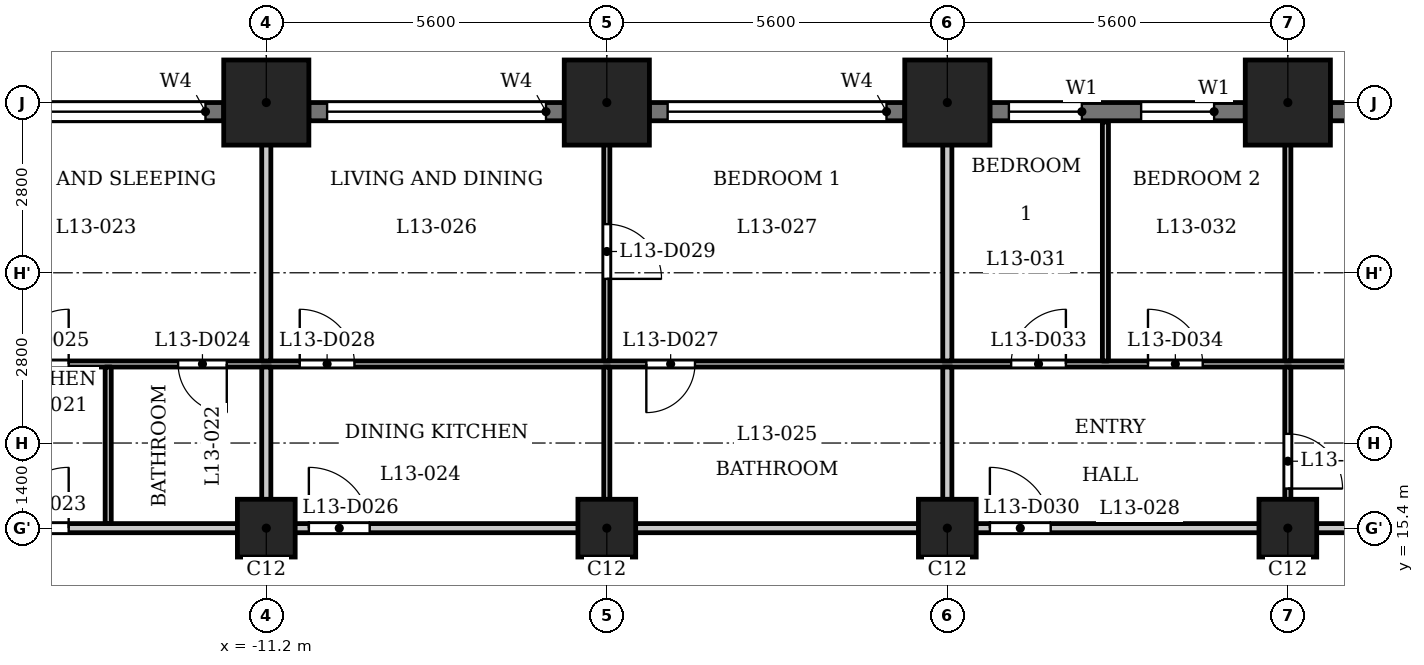
"""IFC4 building model, lengths in metres.
Left out: names, types, materials, properties, quantities, classifications, styles, units other than length and angle.
Written with IfcOpenShell. Run it as: python <this file> out.ifc"""

import sys

from ifc_helpers import new_model, si_unit, direction, frame, frame_2d, origin, origin_2d, place, context, subcontext, project, spatial, rectangle, extrude, element, fill, save


model = new_model("IFC4")
c1 = context("Model", 3, precision=1e-05, world=origin(), true_north=direction((0.0, 1.0)))
c2 = subcontext(c1, "Body", "Model", "MODEL_VIEW")
j1 = project(units=[si_unit("LENGTHUNIT", "METRE"), si_unit("PLANEANGLEUNIT", "RADIAN")], contexts=[c1])
p1 = place(None, origin())
s1 = spatial("IfcSite", under=j1, at=p1, CompositionType="ELEMENT")
p2 = place(p1, origin())
s2 = spatial("IfcBuilding", under=s1, at=p2, CompositionType="ELEMENT")
p3 = place(p2, frame((0.0, 0.0, 55.0)))
s3 = spatial("IfcBuildingStorey", under=s2, at=p3, CompositionType="ELEMENT", Elevation=55.0)
for number, where, z_axis, x_axis in (
    (1, (5.6, 22.4, 0.0), (0.0, 0.0, 1.0), (1.0, 0.0, 0.0)),
    (2, (0.0, 22.4, 0.0), (0.0, 0.0, 1.0), (1.0, 0.0, 0.0)),
    (3, (-5.6, 22.4, 0.0), (0.0, 0.0, 1.0), (1.0, 0.0, 0.0)),
    (4, (-11.2, 22.4, 0.0), (0.0, 0.0, 1.0), (1.0, 0.0, 0.0)),
):
    element("IfcColumn", number, at=place(p3, frame(where, z_axis=z_axis, x_axis=x_axis)), inside=s3, PredefinedType="COLUMN", context=c2, shape_type="SweptSolid", body=[
        extrude(rectangle(XDim=1.4, YDim=1.4, at=origin_2d()), origin(), (0.0, 0.0, 1.0), 3.5),
    ])
for number, where, z_axis, x_axis in (
    (5, (-11.2, 15.4, 0.0), (0.0, 0.0, 1.0), (1.0, 0.0, 0.0)),
    (6, (-5.6, 15.4, 0.0), (0.0, 0.0, 1.0), (1.0, 0.0, 0.0)),
    (7, (0.0, 15.4, 0.0), (0.0, 0.0, 1.0), (1.0, 0.0, 0.0)),
    (8, (5.6, 15.4, 0.0), (0.0, 0.0, 1.0), (1.0, 0.0, 0.0)),
):
    element("IfcColumn", number, at=place(p3, frame(where, z_axis=z_axis, x_axis=x_axis)), inside=s3, PredefinedType="COLUMN", context=c2, shape_type="SweptSolid", body=[
        extrude(rectangle(XDim=0.95, YDim=0.95, at=origin_2d()), origin(), (0.0, 0.0, 1.0), 3.5),
    ])
p4 = place(p3, frame((10.5, 22.25, 0.0), z_axis=(0.0, 0.0, 1.0), x_axis=(-1.0, 0.0, 0.0)))
e9 = element("IfcWall", 9, at=p4, inside=s3, PredefinedType="SOLIDWALL", context=c2, shape_type="SweptSolid", body=[
    extrude(rectangle(XDim=4.2, YDim=0.3, at=frame_2d((2.1, 0.0))), origin(), (0.0, 0.0, 1.0), 2.35),
])
p5 = place(p4, frame((0.3, 0.0, 1.2)))
e10 = element("IfcOpeningElement", 10, at=p5, cuts=e9, PredefinedType="OPENING", context=c2, shape_type="SweptSolid", body=[
    extrude(rectangle(XDim=3.6, YDim=0.95, at=frame_2d((1.8, 0.475))), frame((0.0, 0.16, 0.0), z_axis=(0.0, -1.0, 0.0), x_axis=(1.0, 0.0, 0.0)), (0.0, 0.0, 1.0), 0.32),
])
p6 = place(p3, frame((4.9, 22.25, 0.0), z_axis=(0.0, 0.0, 1.0), x_axis=(-1.0, 0.0, 0.0)))
e11 = element("IfcWall", 11, at=p6, inside=s3, PredefinedType="SOLIDWALL", context=c2, shape_type="SweptSolid", body=[
    extrude(rectangle(XDim=4.2, YDim=0.3, at=frame_2d((2.1, 0.0))), origin(), (0.0, 0.0, 1.0), 2.35),
])
p7 = place(p6, frame((0.512, 0.0, 0.6)))
e12 = element("IfcOpeningElement", 12, at=p7, cuts=e11, PredefinedType="OPENING", context=c2, shape_type="SweptSolid", body=[
    extrude(rectangle(XDim=1.2, YDim=1.55, at=frame_2d((0.6, 0.775))), frame((0.0, 0.16, 0.0), z_axis=(0.0, -1.0, 0.0), x_axis=(1.0, 0.0, 0.0)), (0.0, 0.0, 1.0), 0.32),
])
p8 = place(p6, frame((2.688, 0.0, 0.6)))
e13 = element("IfcOpeningElement", 13, at=p8, cuts=e11, PredefinedType="OPENING", context=c2, shape_type="SweptSolid", body=[
    extrude(rectangle(XDim=1.2, YDim=1.55, at=frame_2d((0.6, 0.775))), frame((0.0, 0.16, 0.0), z_axis=(0.0, -1.0, 0.0), x_axis=(1.0, 0.0, 0.0)), (0.0, 0.0, 1.0), 0.32),
])
p9 = place(p3, frame((-0.7, 22.25, 0.0), z_axis=(0.0, 0.0, 1.0), x_axis=(-1.0, 0.0, 0.0)))
e14 = element("IfcWall", 14, at=p9, inside=s3, PredefinedType="SOLIDWALL", context=c2, shape_type="SweptSolid", body=[
    extrude(rectangle(XDim=4.2, YDim=0.3, at=frame_2d((2.1, 0.0))), origin(), (0.0, 0.0, 1.0), 2.35),
])
p10 = place(p9, frame((0.3, 0.0, 1.2)))
e15 = element("IfcOpeningElement", 15, at=p10, cuts=e14, PredefinedType="OPENING", context=c2, shape_type="SweptSolid", body=[
    extrude(rectangle(XDim=3.6, YDim=0.95, at=frame_2d((1.8, 0.475))), frame((0.0, 0.16, 0.0), z_axis=(0.0, -1.0, 0.0), x_axis=(1.0, 0.0, 0.0)), (0.0, 0.0, 1.0), 0.32),
])
p11 = place(p3, frame((-6.3, 22.25, 0.0), z_axis=(0.0, 0.0, 1.0), x_axis=(-1.0, 0.0, 0.0)))
e16 = element("IfcWall", 16, at=p11, inside=s3, PredefinedType="SOLIDWALL", context=c2, shape_type="SweptSolid", body=[
    extrude(rectangle(XDim=4.2, YDim=0.3, at=frame_2d((2.1, 0.0))), origin(), (0.0, 0.0, 1.0), 2.35),
])
p12 = place(p11, frame((0.3, 0.0, 1.2)))
e17 = element("IfcOpeningElement", 17, at=p12, cuts=e16, PredefinedType="OPENING", context=c2, shape_type="SweptSolid", body=[
    extrude(rectangle(XDim=3.6, YDim=0.95, at=frame_2d((1.8, 0.475))), frame((0.0, 0.16, 0.0), z_axis=(0.0, -1.0, 0.0), x_axis=(1.0, 0.0, 0.0)), (0.0, 0.0, 1.0), 0.32),
])
p13 = place(p3, frame((-11.9, 22.25, 0.0), z_axis=(0.0, 0.0, 1.0), x_axis=(-1.0, 0.0, 0.0)))
e18 = element("IfcWall", 18, at=p13, inside=s3, PredefinedType="SOLIDWALL", context=c2, shape_type="SweptSolid", body=[
    extrude(rectangle(XDim=4.2, YDim=0.3, at=frame_2d((2.1, 0.0))), origin(), (0.0, 0.0, 1.0), 2.35),
])
p14 = place(p13, frame((0.3, 0.0, 1.2)))
e19 = element("IfcOpeningElement", 19, at=p14, cuts=e18, PredefinedType="OPENING", context=c2, shape_type="SweptSolid", body=[
    extrude(rectangle(XDim=3.6, YDim=0.95, at=frame_2d((1.8, 0.475))), frame((0.0, 0.16, 0.0), z_axis=(0.0, -1.0, 0.0), x_axis=(1.0, 0.0, 0.0)), (0.0, 0.0, 1.0), 0.32),
])
p15 = place(p3, frame((-27.484, 15.4, 0.0), z_axis=(0.0, 0.0, 1.0), x_axis=(1.0, 0.0, 0.0)))
e20 = element("IfcWall", 20, at=p15, inside=s3, PredefinedType="PARTITIONING", context=c2, shape_type="SweptSolid", body=[
    extrude(rectangle(XDim=54.968, YDim=0.15, at=frame_2d((27.484, 0.0))), origin(), (0.0, 0.0, 1.0), 3.2),
])
p16 = place(p15, frame((8.784, 0.0, 0.0)))
e21 = element("IfcOpeningElement", 21, at=p16, cuts=e20, PredefinedType="OPENING", context=c2, shape_type="SweptSolid", body=[
    extrude(rectangle(XDim=1.0, YDim=2.1, at=frame_2d((0.5, 1.05))), frame((0.0, 0.085, 0.0), z_axis=(0.0, -1.0, 0.0), x_axis=(1.0, 0.0, 0.0)), (0.0, 0.0, 1.0), 0.17),
])
p17 = place(p15, frame((12.034, 0.0, 0.0)))
e22 = element("IfcOpeningElement", 22, at=p17, cuts=e20, PredefinedType="OPENING", context=c2, shape_type="SweptSolid", body=[
    extrude(rectangle(XDim=1.0, YDim=2.1, at=frame_2d((0.5, 1.05))), frame((0.0, 0.085, 0.0), z_axis=(0.0, -1.0, 0.0), x_axis=(1.0, 0.0, 0.0)), (0.0, 0.0, 1.0), 0.17),
])
p18 = place(p15, frame((16.984, 0.0, 0.0)))
e23 = element("IfcOpeningElement", 23, at=p18, cuts=e20, PredefinedType="OPENING", context=c2, shape_type="SweptSolid", body=[
    extrude(rectangle(XDim=1.0, YDim=2.1, at=frame_2d((0.5, 1.05))), frame((0.0, 0.085, 0.0), z_axis=(0.0, -1.0, 0.0), x_axis=(1.0, 0.0, 0.0)), (0.0, 0.0, 1.0), 0.17),
])
p19 = place(p15, frame((28.184, 0.0, 0.0)))
e24 = element("IfcOpeningElement", 24, at=p19, cuts=e20, PredefinedType="OPENING", context=c2, shape_type="SweptSolid", body=[
    extrude(rectangle(XDim=1.0, YDim=2.1, at=frame_2d((0.5, 1.05))), frame((0.0, 0.085, 0.0), z_axis=(0.0, -1.0, 0.0), x_axis=(1.0, 0.0, 0.0)), (0.0, 0.0, 1.0), 0.17),
])
p20 = place(p15, frame((48.234, 0.0, 0.0)))
e25 = element("IfcOpeningElement", 25, at=p20, cuts=e20, PredefinedType="OPENING", context=c2, shape_type="SweptSolid", body=[
    extrude(rectangle(XDim=1.0, YDim=2.1, at=frame_2d((0.5, 1.05))), frame((0.0, 0.085, 0.0), z_axis=(0.0, -1.0, 0.0), x_axis=(1.0, 0.0, 0.0)), (0.0, 0.0, 1.0), 0.17),
])
p21 = place(p3, frame((-26.44, 18.1, 0.0), z_axis=(0.0, 0.0, 1.0), x_axis=(1.0, 0.0, 0.0)))
e26 = element("IfcWall", 26, at=p21, inside=s3, PredefinedType="PARTITIONING", context=c2, shape_type="SweptSolid", body=[
    extrude(rectangle(XDim=52.63, YDim=0.1, at=frame_2d((26.315, 0.0))), origin(), (0.0, 0.0, 1.0), 3.2),
])
p22 = place(p21, frame((2.626, 0.0, 0.0)))
e27 = element("IfcOpeningElement", 27, at=p22, cuts=e26, PredefinedType="OPENING", context=c2, shape_type="SweptSolid", body=[
    extrude(rectangle(XDim=0.8, YDim=2.1, at=frame_2d((0.4, 1.05))), frame((0.0, 0.06, 0.0), z_axis=(0.0, -1.0, 0.0), x_axis=(1.0, 0.0, 0.0)), (0.0, 0.0, 1.0), 0.12),
])
p23 = place(p21, frame((7.84, 0.0, 0.0)))
e28 = element("IfcOpeningElement", 28, at=p23, cuts=e26, PredefinedType="OPENING", context=c2, shape_type="SweptSolid", body=[
    extrude(rectangle(XDim=0.9, YDim=2.1, at=frame_2d((0.45, 1.05))), frame((0.0, 0.06, 0.0), z_axis=(0.0, -1.0, 0.0), x_axis=(1.0, 0.0, 0.0)), (0.0, 0.0, 1.0), 0.12),
])
p24 = place(p21, frame((13.79, 0.0, 0.0)))
e29 = element("IfcOpeningElement", 29, at=p24, cuts=e26, PredefinedType="OPENING", context=c2, shape_type="SweptSolid", body=[
    extrude(rectangle(XDim=0.8, YDim=2.1, at=frame_2d((0.4, 1.05))), frame((0.0, 0.06, 0.0), z_axis=(0.0, -1.0, 0.0), x_axis=(1.0, 0.0, 0.0)), (0.0, 0.0, 1.0), 0.12),
])
p25 = place(p21, frame((11.09, 0.0, 0.0)))
e30 = element("IfcOpeningElement", 30, at=p25, cuts=e26, PredefinedType="OPENING", context=c2, shape_type="SweptSolid", body=[
    extrude(rectangle(XDim=0.9, YDim=2.1, at=frame_2d((0.45, 1.05))), frame((0.0, 0.06, 0.0), z_axis=(0.0, -1.0, 0.0), x_axis=(1.0, 0.0, 0.0)), (0.0, 0.0, 1.0), 0.12),
])
p26 = place(p21, frame((21.49, 0.0, 0.0)))
e31 = element("IfcOpeningElement", 31, at=p26, cuts=e26, PredefinedType="OPENING", context=c2, shape_type="SweptSolid", body=[
    extrude(rectangle(XDim=0.8, YDim=2.1, at=frame_2d((0.4, 1.05))), frame((0.0, 0.06, 0.0), z_axis=(0.0, -1.0, 0.0), x_axis=(1.0, 0.0, 0.0)), (0.0, 0.0, 1.0), 0.12),
])
p27 = place(p21, frame((15.79, 0.0, 0.0)))
e32 = element("IfcOpeningElement", 32, at=p27, cuts=e26, PredefinedType="OPENING", context=c2, shape_type="SweptSolid", body=[
    extrude(rectangle(XDim=0.9, YDim=2.1, at=frame_2d((0.45, 1.05))), frame((0.0, 0.06, 0.0), z_axis=(0.0, -1.0, 0.0), x_axis=(1.0, 0.0, 0.0)), (0.0, 0.0, 1.0), 0.12),
])
p28 = place(p21, frame((27.49, 0.0, 0.0)))
e33 = element("IfcOpeningElement", 33, at=p28, cuts=e26, PredefinedType="OPENING", context=c2, shape_type="SweptSolid", body=[
    extrude(rectangle(XDim=0.9, YDim=2.1, at=frame_2d((0.45, 1.05))), frame((0.0, 0.06, 0.0), z_axis=(0.0, -1.0, 0.0), x_axis=(1.0, 0.0, 0.0)), (0.0, 0.0, 1.0), 0.12),
])
p29 = place(p21, frame((29.74, 0.0, 0.0)))
e34 = element("IfcOpeningElement", 34, at=p29, cuts=e26, PredefinedType="OPENING", context=c2, shape_type="SweptSolid", body=[
    extrude(rectangle(XDim=0.9, YDim=2.1, at=frame_2d((0.45, 1.05))), frame((0.0, 0.06, 0.0), z_axis=(0.0, -1.0, 0.0), x_axis=(1.0, 0.0, 0.0)), (0.0, 0.0, 1.0), 0.12),
])
p30 = place(p21, frame((35.84, 0.0, 0.0)))
e35 = element("IfcOpeningElement", 35, at=p30, cuts=e26, PredefinedType="OPENING", context=c2, shape_type="SweptSolid", body=[
    extrude(rectangle(XDim=0.9, YDim=2.1, at=frame_2d((0.45, 1.05))), frame((0.0, 0.06, 0.0), z_axis=(0.0, -1.0, 0.0), x_axis=(1.0, 0.0, 0.0)), (0.0, 0.0, 1.0), 0.12),
])
p31 = place(p21, frame((50.74, 0.0, 0.0)))
e36 = element("IfcOpeningElement", 36, at=p31, cuts=e26, PredefinedType="OPENING", context=c2, shape_type="SweptSolid", body=[
    extrude(rectangle(XDim=0.8, YDim=2.1, at=frame_2d((0.4, 1.05))), frame((0.0, 0.06, 0.0), z_axis=(0.0, -1.0, 0.0), x_axis=(1.0, 0.0, 0.0)), (0.0, 0.0, 1.0), 0.12),
])
p32 = place(p21, frame((47.29, 0.0, 0.0)))
e37 = element("IfcOpeningElement", 37, at=p32, cuts=e26, PredefinedType="OPENING", context=c2, shape_type="SweptSolid", body=[
    extrude(rectangle(XDim=0.9, YDim=2.1, at=frame_2d((0.45, 1.05))), frame((0.0, 0.06, 0.0), z_axis=(0.0, -1.0, 0.0), x_axis=(1.0, 0.0, 0.0)), (0.0, 0.0, 1.0), 0.12),
])
p33 = place(p3, frame((-13.8, 15.475, 0.0), z_axis=(0.0, 0.0, 1.0), x_axis=(0.0, 1.0, 0.0)))
e38 = element("IfcWall", 38, at=p33, inside=s3, PredefinedType="PARTITIONING", context=c2, shape_type="SweptSolid", body=[
    extrude(rectangle(XDim=2.575, YDim=0.1, at=frame_2d((1.288, 0.0))), origin(), (0.0, 0.0, 1.0), 3.2),
])
p34 = place(p3, frame((-11.2, 15.475, 0.0), z_axis=(0.0, 0.0, 1.0), x_axis=(0.0, 1.0, 0.0)))
e39 = element("IfcWall", 39, at=p34, inside=s3, PredefinedType="PARTITIONING", context=c2, shape_type="SweptSolid", body=[
    extrude(rectangle(XDim=2.575, YDim=0.15, at=frame_2d((1.288, 0.0))), origin(), (0.0, 0.0, 1.0), 3.2),
])
p35 = place(p3, frame((-11.2, 18.15, 0.0), z_axis=(0.0, 0.0, 1.0), x_axis=(0.0, 1.0, 0.0)))
e40 = element("IfcWall", 40, at=p35, inside=s3, PredefinedType="PARTITIONING", context=c2, shape_type="SweptSolid", body=[
    extrude(rectangle(XDim=4.93, YDim=0.15, at=frame_2d((2.465, 0.0))), origin(), (0.0, 0.0, 1.0), 3.2),
])
p36 = place(p3, frame((-5.6, 15.475, 0.0), z_axis=(0.0, 0.0, 1.0), x_axis=(0.0, 1.0, 0.0)))
e41 = element("IfcWall", 41, at=p36, inside=s3, PredefinedType="PARTITIONING", context=c2, shape_type="SweptSolid", body=[
    extrude(rectangle(XDim=2.575, YDim=0.1, at=frame_2d((1.288, 0.0))), origin(), (0.0, 0.0, 1.0), 3.2),
])
p37 = place(p3, frame((-5.6, 18.15, 0.0), z_axis=(0.0, 0.0, 1.0), x_axis=(0.0, 1.0, 0.0)))
e42 = element("IfcWall", 42, at=p37, inside=s3, PredefinedType="PARTITIONING", context=c2, shape_type="SweptSolid", body=[
    extrude(rectangle(XDim=4.93, YDim=0.1, at=frame_2d((2.465, 0.0))), origin(), (0.0, 0.0, 1.0), 3.2),
])
p38 = place(p37, frame((1.35, 0.0, 0.0)))
e43 = element("IfcOpeningElement", 43, at=p38, cuts=e42, PredefinedType="OPENING", context=c2, shape_type="SweptSolid", body=[
    extrude(rectangle(XDim=0.9, YDim=2.1, at=frame_2d((0.45, 1.05))), frame((0.0, 0.06, 0.0), z_axis=(0.0, -1.0, 0.0), x_axis=(1.0, 0.0, 0.0)), (0.0, 0.0, 1.0), 0.12),
])
p39 = place(p3, frame((0.0, 15.475, 0.0), z_axis=(0.0, 0.0, 1.0), x_axis=(0.0, 1.0, 0.0)))
e44 = element("IfcWall", 44, at=p39, inside=s3, PredefinedType="PARTITIONING", context=c2, shape_type="SweptSolid", body=[
    extrude(rectangle(XDim=2.575, YDim=0.15, at=frame_2d((1.288, 0.0))), origin(), (0.0, 0.0, 1.0), 3.2),
])
p40 = place(p3, frame((0.0, 18.15, 0.0), z_axis=(0.0, 0.0, 1.0), x_axis=(0.0, 1.0, 0.0)))
e45 = element("IfcWall", 45, at=p40, inside=s3, PredefinedType="PARTITIONING", context=c2, shape_type="SweptSolid", body=[
    extrude(rectangle(XDim=4.93, YDim=0.15, at=frame_2d((2.465, 0.0))), origin(), (0.0, 0.0, 1.0), 3.2),
])
p41 = place(p3, frame((2.6, 18.15, 0.0), z_axis=(0.0, 0.0, 1.0), x_axis=(0.0, 1.0, 0.0)))
e46 = element("IfcWall", 46, at=p41, inside=s3, PredefinedType="PARTITIONING", context=c2, shape_type="SweptSolid", body=[
    extrude(rectangle(XDim=3.93, YDim=0.1, at=frame_2d((1.965, 0.0))), origin(), (0.0, 0.0, 1.0), 3.2),
])
p42 = place(p3, frame((5.6, 15.475, 0.0), z_axis=(0.0, 0.0, 1.0), x_axis=(0.0, 1.0, 0.0)))
e47 = element("IfcWall", 47, at=p42, inside=s3, PredefinedType="PARTITIONING", context=c2, shape_type="SweptSolid", body=[
    extrude(rectangle(XDim=2.575, YDim=0.1, at=frame_2d((1.288, 0.0))), origin(), (0.0, 0.0, 1.0), 3.2),
])
p43 = place(p42, frame((0.576, 0.0, 0.0)))
e48 = element("IfcOpeningElement", 48, at=p43, cuts=e47, PredefinedType="OPENING", context=c2, shape_type="SweptSolid", body=[
    extrude(rectangle(XDim=0.9, YDim=2.1, at=frame_2d((0.45, 1.05))), frame((0.0, 0.06, 0.0), z_axis=(0.0, -1.0, 0.0), x_axis=(1.0, 0.0, 0.0)), (0.0, 0.0, 1.0), 0.12),
])
p44 = place(p3, frame((5.6, 18.15, 0.0), z_axis=(0.0, 0.0, 1.0), x_axis=(0.0, 1.0, 0.0)))
e49 = element("IfcWall", 49, at=p44, inside=s3, PredefinedType="PARTITIONING", context=c2, shape_type="SweptSolid", body=[
    extrude(rectangle(XDim=4.93, YDim=0.1, at=frame_2d((2.465, 0.0))), origin(), (0.0, 0.0, 1.0), 3.2),
])
p45 = place(p17, origin())
e50 = element("IfcDoor", 50, at=p45, inside=s3, OperationType="SINGLE_SWING_LEFT", PredefinedType="DOOR", context=c2, shape_type="SweptSolid", body=[
    extrude(rectangle(XDim=1.0, YDim=2.1, at=frame_2d((0.5, 1.05))), frame((0.0, 0.025, 0.0), z_axis=(0.0, -1.0, 0.0), x_axis=(1.0, 0.0, 0.0)), (0.0, 0.0, 1.0), 0.05),
])
fill(e22, e50)
p46 = place(p24, origin())
e51 = element("IfcDoor", 51, at=p46, inside=s3, OperationType="SINGLE_SWING_RIGHT", PredefinedType="DOOR", context=c2, shape_type="SweptSolid", body=[
    extrude(rectangle(XDim=0.8, YDim=2.1, at=frame_2d((0.4, 1.05))), frame((0.0, 0.025, 0.0), z_axis=(0.0, -1.0, 0.0), x_axis=(1.0, 0.0, 0.0)), (0.0, 0.0, 1.0), 0.05),
])
fill(e29, e51)
p47 = place(p25, origin())
e52 = element("IfcDoor", 52, at=p47, inside=s3, OperationType="SINGLE_SWING_LEFT", PredefinedType="DOOR", context=c2, shape_type="SweptSolid", body=[
    extrude(rectangle(XDim=0.9, YDim=2.1, at=frame_2d((0.45, 1.05))), frame((0.0, 0.025, 0.0), z_axis=(0.0, -1.0, 0.0), x_axis=(1.0, 0.0, 0.0)), (0.0, 0.0, 1.0), 0.05),
])
fill(e30, e52)
p48 = place(p18, origin())
e53 = element("IfcDoor", 53, at=p48, inside=s3, OperationType="SINGLE_SWING_RIGHT", PredefinedType="DOOR", context=c2, shape_type="SweptSolid", body=[
    extrude(rectangle(XDim=1.0, YDim=2.1, at=frame_2d((0.5, 1.05))), frame((0.0, 0.025, 0.0), z_axis=(0.0, -1.0, 0.0), x_axis=(1.0, 0.0, 0.0)), (0.0, 0.0, 1.0), 0.05),
])
fill(e23, e53)
p49 = place(p26, origin())
e54 = element("IfcDoor", 54, at=p49, inside=s3, OperationType="SINGLE_SWING_LEFT", PredefinedType="DOOR", context=c2, shape_type="SweptSolid", body=[
    extrude(rectangle(XDim=0.8, YDim=2.1, at=frame_2d((0.4, 1.05))), frame((0.0, 0.025, 0.0), z_axis=(0.0, -1.0, 0.0), x_axis=(1.0, 0.0, 0.0)), (0.0, 0.0, 1.0), 0.05),
])
fill(e31, e54)
p50 = place(p27, origin())
e55 = element("IfcDoor", 55, at=p50, inside=s3, OperationType="SINGLE_SWING_RIGHT", PredefinedType="DOOR", context=c2, shape_type="SweptSolid", body=[
    extrude(rectangle(XDim=0.9, YDim=2.1, at=frame_2d((0.45, 1.05))), frame((0.0, 0.025, 0.0), z_axis=(0.0, -1.0, 0.0), x_axis=(1.0, 0.0, 0.0)), (0.0, 0.0, 1.0), 0.05),
])
fill(e32, e55)
p51 = place(p38, origin())
e56 = element("IfcDoor", 56, at=p51, inside=s3, OperationType="SINGLE_SWING_LEFT", PredefinedType="DOOR", context=c2, shape_type="SweptSolid", body=[
    extrude(rectangle(XDim=0.9, YDim=2.1, at=frame_2d((0.45, 1.05))), frame((0.0, 0.025, 0.0), z_axis=(0.0, -1.0, 0.0), x_axis=(1.0, 0.0, 0.0)), (0.0, 0.0, 1.0), 0.05),
])
fill(e43, e56)
p52 = place(p19, origin())
e57 = element("IfcDoor", 57, at=p52, inside=s3, OperationType="SINGLE_SWING_RIGHT", PredefinedType="DOOR", context=c2, shape_type="SweptSolid", body=[
    extrude(rectangle(XDim=1.0, YDim=2.1, at=frame_2d((0.5, 1.05))), frame((0.0, 0.025, 0.0), z_axis=(0.0, -1.0, 0.0), x_axis=(1.0, 0.0, 0.0)), (0.0, 0.0, 1.0), 0.05),
])
fill(e24, e57)
p53 = place(p43, origin())
e58 = element("IfcDoor", 58, at=p53, inside=s3, OperationType="SINGLE_SWING_LEFT", PredefinedType="DOOR", context=c2, shape_type="SweptSolid", body=[
    extrude(rectangle(XDim=0.9, YDim=2.1, at=frame_2d((0.45, 1.05))), frame((0.0, 0.025, 0.0), z_axis=(0.0, -1.0, 0.0), x_axis=(1.0, 0.0, 0.0)), (0.0, 0.0, 1.0), 0.05),
])
fill(e48, e58)
p54 = place(p28, origin())
e59 = element("IfcDoor", 59, at=p54, inside=s3, OperationType="SINGLE_SWING_LEFT", PredefinedType="DOOR", context=c2, shape_type="SweptSolid", body=[
    extrude(rectangle(XDim=0.9, YDim=2.1, at=frame_2d((0.45, 1.05))), frame((0.0, 0.025, 0.0), z_axis=(0.0, -1.0, 0.0), x_axis=(1.0, 0.0, 0.0)), (0.0, 0.0, 1.0), 0.05),
])
fill(e33, e59)
p55 = place(p29, origin())
e60 = element("IfcDoor", 60, at=p55, inside=s3, OperationType="SINGLE_SWING_RIGHT", PredefinedType="DOOR", context=c2, shape_type="SweptSolid", body=[
    extrude(rectangle(XDim=0.9, YDim=2.1, at=frame_2d((0.45, 1.05))), frame((0.0, 0.025, 0.0), z_axis=(0.0, -1.0, 0.0), x_axis=(1.0, 0.0, 0.0)), (0.0, 0.0, 1.0), 0.05),
])
fill(e34, e60)
p56 = place(p7, origin())
e61 = element("IfcWindow", 61, at=p56, inside=s3, PartitioningType="SINGLE_PANEL", PredefinedType="WINDOW", context=c2, shape_type="SweptSolid", body=[
    extrude(rectangle(XDim=1.2, YDim=1.55, at=frame_2d((0.6, 0.775))), frame((0.0, 0.03, 0.0), z_axis=(0.0, -1.0, 0.0), x_axis=(1.0, 0.0, 0.0)), (0.0, 0.0, 1.0), 0.06),
])
fill(e12, e61)
p57 = place(p8, origin())
e62 = element("IfcWindow", 62, at=p57, inside=s3, PartitioningType="SINGLE_PANEL", PredefinedType="WINDOW", context=c2, shape_type="SweptSolid", body=[
    extrude(rectangle(XDim=1.2, YDim=1.55, at=frame_2d((0.6, 0.775))), frame((0.0, 0.03, 0.0), z_axis=(0.0, -1.0, 0.0), x_axis=(1.0, 0.0, 0.0)), (0.0, 0.0, 1.0), 0.06),
])
fill(e13, e62)
p58 = place(p10, origin())
e63 = element("IfcWindow", 63, at=p58, inside=s3, PartitioningType="SINGLE_PANEL", PredefinedType="WINDOW", context=c2, shape_type="SweptSolid", body=[
    extrude(rectangle(XDim=3.6, YDim=0.95, at=frame_2d((1.8, 0.475))), frame((0.0, 0.03, 0.0), z_axis=(0.0, -1.0, 0.0), x_axis=(1.0, 0.0, 0.0)), (0.0, 0.0, 1.0), 0.06),
])
fill(e15, e63)
p59 = place(p12, origin())
e64 = element("IfcWindow", 64, at=p59, inside=s3, PartitioningType="SINGLE_PANEL", PredefinedType="WINDOW", context=c2, shape_type="SweptSolid", body=[
    extrude(rectangle(XDim=3.6, YDim=0.95, at=frame_2d((1.8, 0.475))), frame((0.0, 0.03, 0.0), z_axis=(0.0, -1.0, 0.0), x_axis=(1.0, 0.0, 0.0)), (0.0, 0.0, 1.0), 0.06),
])
fill(e17, e64)
p60 = place(p14, origin())
e65 = element("IfcWindow", 65, at=p60, inside=s3, PartitioningType="SINGLE_PANEL", PredefinedType="WINDOW", context=c2, shape_type="SweptSolid", body=[
    extrude(rectangle(XDim=3.6, YDim=0.95, at=frame_2d((1.8, 0.475))), frame((0.0, 0.03, 0.0), z_axis=(0.0, -1.0, 0.0), x_axis=(1.0, 0.0, 0.0)), (0.0, 0.0, 1.0), 0.06),
])
fill(e19, e65)
save(model, sys.argv[1])
